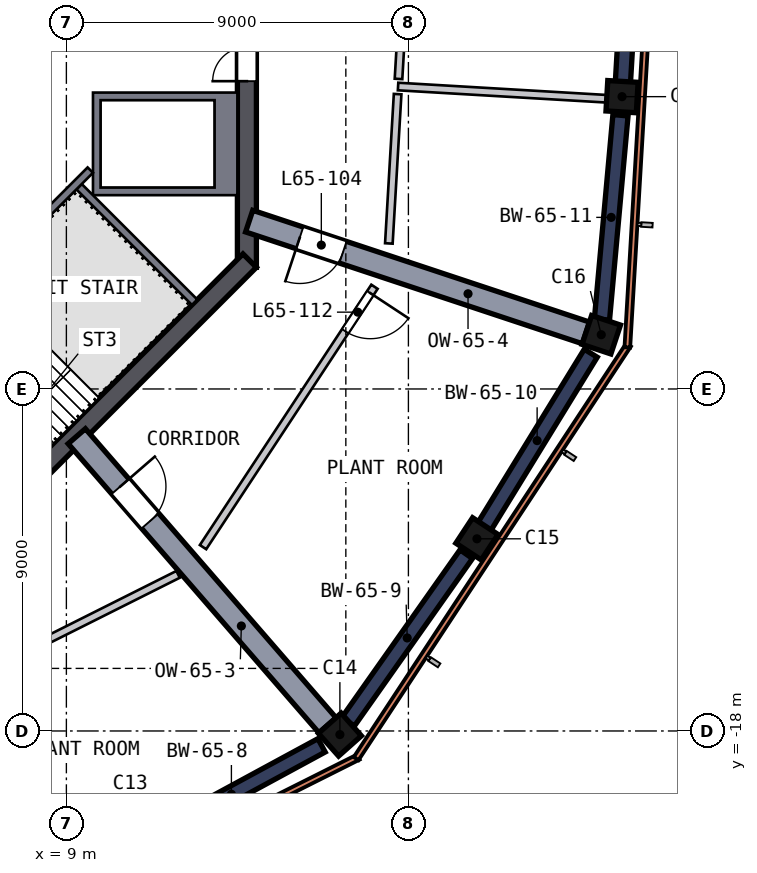
"""IFC4 building model, lengths in metres.
Left out: names, types, materials, properties, quantities, classifications, styles, units other than length and angle.
Written with IfcOpenShell. Run it as: python <this file> out.ifc"""

import sys

from ifc_helpers import new_model, si_unit, direction, frame, frame_2d, origin, origin_2d, place, context, subcontext, project, spatial, polyline, rectangle, outline, extrude, element, fill, save


model = new_model("IFC4")
c1 = context("Model", 3, precision=1e-05, world=origin(), true_north=direction((0.0, 1.0)))
c2 = subcontext(c1, "Body", "Model", "MODEL_VIEW")
j1 = project(units=[si_unit("LENGTHUNIT", "METRE"), si_unit("PLANEANGLEUNIT", "RADIAN")], contexts=[c1])
p1 = place(None, origin())
s1 = spatial("IfcSite", under=j1, at=p1, CompositionType="ELEMENT")
p2 = place(p1, origin())
s2 = spatial("IfcBuilding", under=s1, at=p2, CompositionType="ELEMENT")
p3 = place(p2, frame((0.0, 0.0, 263.0)))
s3 = spatial("IfcBuildingStorey", under=s2, at=p3, CompositionType="ELEMENT", Elevation=263.0)
p4 = place(p3, frame((16.137, -18.15, 0.0), z_axis=(0.050177782, 0.045360282, 0.997709695), x_axis=(-0.745725805, -0.662810667, 0.06763906)))
e1 = element("IfcColumn", 1, at=p4, inside=s3, PredefinedType="COLUMN", context=c2, shape_type="SweptSolid", body=[
    extrude(rectangle(XDim=0.8, YDim=0.8, at=origin_2d()), origin(), (0.0, 0.0, 1.0), 4.51),
])
p5 = place(p3, frame((19.76, -13.01, 0.0), z_axis=(0.035783507, 0.055380526, 0.997823901), x_axis=(0.548557504, 0.833509154, -0.065932963)))
e2 = element("IfcColumn", 2, at=p5, inside=s3, PredefinedType="COLUMN", context=c2, shape_type="SweptSolid", body=[
    extrude(rectangle(XDim=0.8, YDim=0.8, at=origin_2d()), origin(), (0.0, 0.0, 1.0), 4.51),
])
p6 = place(p3, frame((23.05, -7.65, 0.0), z_axis=(0.020785631, 0.064359674, 0.997710274), x_axis=(-0.314605933, -0.946810023, 0.067630523)))
e3 = element("IfcColumn", 3, at=p6, inside=s3, PredefinedType="COLUMN", context=c2, shape_type="SweptSolid", body=[
    extrude(rectangle(XDim=0.8, YDim=0.8, at=origin_2d()), origin(), (0.0, 0.0, 1.0), 4.51),
])
p7 = place(p3, frame((23.618, -1.387, 0.0), z_axis=(0.003302254, 0.065882664, 0.997821913), x_axis=(0.058334022, 0.996115464, -0.065963048)))
e4 = element("IfcColumn", 4, at=p7, inside=s3, PredefinedType="COLUMN", context=c2, shape_type="SweptSolid", body=[
    extrude(rectangle(XDim=0.8, YDim=0.8, at=origin_2d()), origin(), (0.0, 0.0, 1.0), 4.51),
])
p8 = place(p3, frame((13.75, -5.799, 0.0), z_axis=(0.0, 0.0, 1.0), x_axis=(0.0, 1.0, 0.0)))
e5 = element("IfcWall", 5, at=p8, inside=s3, PredefinedType="SHEAR", context=c2, shape_type="SweptSolid", body=[
    extrude(rectangle(XDim=11.598, YDim=0.5, at=frame_2d((5.799, 0.0))), origin(), (0.0, 0.0, 1.0), 6.0),
])
p9 = place(p8, frame((4.899, 0.0, 0.0)))
e6 = element("IfcOpeningElement", 6, at=p9, cuts=e5, PredefinedType="OPENING", context=c2, shape_type="SweptSolid", body=[
    extrude(rectangle(XDim=1.8, YDim=2.1, at=frame_2d((0.9, 1.05))), frame((0.0, 0.26, 0.0), z_axis=(0.0, -1.0, 0.0), x_axis=(1.0, 0.0, 0.0)), (0.0, 0.0, 1.0), 0.52),
])
p10 = place(p3, frame((5.622, -13.823, 0.0), z_axis=(0.0, 0.0, 1.0), x_axis=(0.707106781, 0.707106781, 0.0)))
e7 = element("IfcWall", 7, at=p10, inside=s3, PredefinedType="SHEAR", context=c2, shape_type="SweptSolid", body=[
    extrude(rectangle(XDim=11.598, YDim=0.5, at=frame_2d((5.799, 0.0))), origin(), (0.0, 0.0, 1.0), 6.0),
])
p11 = place(p10, frame((2.099, 0.0, 0.0)))
e8 = element("IfcOpeningElement", 8, at=p11, cuts=e7, PredefinedType="OPENING", context=c2, shape_type="SweptSolid", body=[
    extrude(rectangle(XDim=1.2, YDim=2.1, at=frame_2d((0.6, 1.05))), frame((0.0, 0.26, 0.0), z_axis=(0.0, -1.0, 0.0), x_axis=(1.0, 0.0, 0.0)), (0.0, 0.0, 1.0), 0.52),
])
p12 = place(p3, frame((10.971, -20.95, 0.0), z_axis=(0.0, 0.0, 1.0), x_axis=(0.879122155, 0.476596513, 0.0)))
e9 = element("IfcWall", 9, at=p12, inside=s3, PredefinedType="SHEAR", context=c2, shape_type="SweptSolid", body=[
    extrude(rectangle(XDim=5.396, YDim=0.4, at=frame_2d((2.698, 0.0))), origin(), (0.0, 0.0, 1.0), 4.5),
])
for number, where, z_axis, x_axis in (
    (10, (16.414, -17.757, 0.0), (0.0, 0.0, 1.0), (0.576, 0.817, 0.0)),
    (11, (19.976, -12.658, 0.0), (0.0, 0.0, 1.0), (0.523, 0.852, 0.0)),
):
    element("IfcWall", number, at=place(p3, frame(where, z_axis=z_axis, x_axis=x_axis)), inside=s3, PredefinedType="SHEAR", context=c2, shape_type="SweptSolid", body=[
        extrude(rectangle(XDim=5.396, YDim=0.4, at=frame_2d((2.698, 0.0))), origin(), (0.0, 0.0, 1.0), 4.5),
    ])
p13 = place(p3, frame((23.093, -7.171, 0.0), z_axis=(0.0, 0.0, 1.0), x_axis=(0.090315437, 0.99591321, 0.0)))
e12 = element("IfcWall", 12, at=p13, inside=s3, PredefinedType="SHEAR", context=c2, shape_type="SweptSolid", body=[
    extrude(rectangle(XDim=5.396, YDim=0.4, at=frame_2d((2.698, 0.0))), origin(), (0.0, 0.0, 1.0), 4.5),
])
p14 = place(p3, frame((23.641, -0.987, 0.0), z_axis=(0.0, 0.0, 1.0), x_axis=(0.058593459, 0.998281927, 0.0)))
e13 = element("IfcWall", 13, at=p14, inside=s3, PredefinedType="SHEAR", context=c2, shape_type="SweptSolid", body=[
    extrude(rectangle(XDim=5.9, YDim=0.4, at=frame_2d((2.95, 0.0))), origin(), (0.0, 0.0, 1.0), 4.5),
])
p15 = place(p3, frame((9.273, -10.243, 0.0), z_axis=(0.0, 0.0, 1.0), x_axis=(0.65518711, -0.755466645, 0.0)))
e14 = element("IfcWall", 14, at=p15, inside=s3, PredefinedType="SHEAR", context=c2, shape_type="SweptSolid", body=[
    extrude(rectangle(XDim=10.07, YDim=0.6, at=frame_2d((5.035, 0.0))), origin(), (0.0, 0.0, 1.0), 4.5),
])
p16 = place(p15, frame((1.75, 0.0, 0.0)))
e15 = element("IfcOpeningElement", 15, at=p16, cuts=e14, PredefinedType="OPENING", context=c2, shape_type="SweptSolid", body=[
    extrude(rectangle(XDim=1.2, YDim=2.1, at=frame_2d((0.6, 1.05))), frame((0.0, 0.31, 0.0), z_axis=(0.0, -1.0, 0.0), x_axis=(1.0, 0.0, 0.0)), (0.0, 0.0, 1.0), 0.62),
])
p17 = place(p3, frame((13.81, -4.583, 0.0), z_axis=(0.0, 0.0, 1.0), x_axis=(0.949093112, -0.314995658, 0.0)))
e16 = element("IfcWall", 16, at=p17, inside=s3, PredefinedType="SHEAR", context=c2, shape_type="SweptSolid", body=[
    extrude(rectangle(XDim=9.335, YDim=0.6, at=frame_2d((4.667, 0.0))), origin(), (0.0, 0.0, 1.0), 4.5),
])
p18 = place(p17, frame((1.4, 0.0, 0.0)))
e17 = element("IfcOpeningElement", 17, at=p18, cuts=e16, PredefinedType="OPENING", context=c2, shape_type="SweptSolid", body=[
    extrude(rectangle(XDim=1.2, YDim=2.1, at=frame_2d((0.6, 1.05))), frame((0.0, 0.31, 0.0), z_axis=(0.0, -1.0, 0.0), x_axis=(1.0, 0.0, 0.0)), (0.0, 0.0, 1.0), 0.62),
])
p19 = place(p3, frame((5.023, -24.536, 0.0), z_axis=(0.0, 0.0, 1.0), x_axis=(0.893850085, 0.448365951, 0.0)))
e18 = element("IfcWall", 18, at=p19, inside=s3, PredefinedType="SOLIDWALL", context=c2, shape_type="SweptSolid", body=[
    extrude(rectangle(XDim=13.046, YDim=0.15, at=frame_2d((6.523, 0.0))), origin(), (0.0, 0.0, 1.0), 4.5),
])
p20 = place(p3, frame((16.624, -18.727, 0.0), z_axis=(0.0, 0.0, 1.0), x_axis=(0.549910588, 0.83522353, 0.0)))
e19 = element("IfcWall", 19, at=p20, inside=s3, PredefinedType="SOLIDWALL", context=c2, shape_type="SweptSolid", body=[
    extrude(rectangle(XDim=13.035, YDim=0.15, at=frame_2d((6.517, 0.0))), origin(), (0.0, 0.0, 1.0), 4.5),
])
p21 = place(p3, frame((23.761, -7.906, 0.0), z_axis=(0.0, 0.0, 1.0), x_axis=(0.058612563, 0.998280806, 0.0)))
e20 = element("IfcWall", 20, at=p21, inside=s3, PredefinedType="SOLIDWALL", context=c2, shape_type="SweptSolid", body=[
    extrude(rectangle(XDim=13.075, YDim=0.15, at=frame_2d((6.538, 0.0))), origin(), (0.0, 0.0, 1.0), 4.5),
])
p22 = place(p3, origin())
e21 = element("IfcWall", 21, at=p22, inside=s3, PredefinedType="SOLIDWALL", context=c2, shape_type="SweptSolid", body=[
    extrude(outline(polyline([(13.5, -1.2), (13.5, -3.9), (9.7, -3.9), (9.7, -1.2), (13.5, -1.2)]), holes=[polyline([(9.9, -3.7), (12.9, -3.7), (12.9, -1.4), (9.9, -1.4), (9.9, -3.7)])]), origin(), (0.0, 0.0, 1.0), 5.55),
])
p23 = place(p3, frame((9.629, -3.24, 0.0), z_axis=(0.0, 0.0, 1.0), x_axis=(-0.707120946, -0.707092617, 0.0)))
e22 = element("IfcWall", 22, at=p23, inside=s3, PredefinedType="SOLIDWALL", context=c2, shape_type="SweptSolid", body=[
    extrude(rectangle(XDim=8.618, YDim=0.2, at=frame_2d((4.309, 0.0))), origin(), (0.0, 0.0, 1.0), 5.55),
])
p24 = place(p23, frame((7.018, 0.0, 0.0)))
e23 = element("IfcOpeningElement", 23, at=p24, cuts=e22, PredefinedType="OPENING", context=c2, shape_type="SweptSolid", body=[
    extrude(rectangle(XDim=1.2, YDim=2.1, at=frame_2d((0.6, 1.05))), frame((0.0, 0.11, 0.0), z_axis=(0.0, -1.0, 0.0), x_axis=(1.0, 0.0, 0.0)), (0.0, 0.0, 1.0), 0.22),
])
p25 = place(p3, frame((9.334, -3.677, 0.0), z_axis=(0.0, 0.0, 1.0), x_axis=(0.707135168, -0.707078393, 0.0)))
e24 = element("IfcWall", 24, at=p25, inside=s3, PredefinedType="SOLIDWALL", context=c2, shape_type="SweptSolid", body=[
    extrude(rectangle(XDim=4.3, YDim=0.2, at=frame_2d((2.15, 0.0))), origin(), (0.0, 0.0, 1.0), 5.55),
])
p26 = place(p3, frame((11.939, -13.878, 0.0), z_axis=(0.0, 0.0, 1.0), x_axis=(-0.893843051, -0.448379973, 0.0)))
e25 = element("IfcWall", 25, at=p26, inside=s3, PredefinedType="SOLIDWALL", context=c2, shape_type="SweptSolid", body=[
    extrude(rectangle(XDim=9.207, YDim=0.2, at=frame_2d((4.604, 0.0))), origin(), (0.0, 0.0, 1.0), 4.5),
])
p27 = place(p26, frame((6.25, 0.0, 0.0)))
e26 = element("IfcOpeningElement", 26, at=p27, cuts=e25, PredefinedType="OPENING", context=c2, shape_type="SweptSolid", body=[
    extrude(rectangle(XDim=1.2, YDim=2.1, at=frame_2d((0.6, 1.05))), frame((0.0, 0.11, 0.0), z_axis=(0.0, -1.0, 0.0), x_axis=(1.0, 0.0, 0.0)), (0.0, 0.0, 1.0), 0.22),
])
p28 = place(p3, frame((17.107, -6.31, 0.0), z_axis=(0.0, 0.0, 1.0), x_axis=(-0.549883224, -0.835241546, 0.0)))
e27 = element("IfcWall", 27, at=p28, inside=s3, PredefinedType="SOLIDWALL", context=c2, shape_type="SweptSolid", body=[
    extrude(rectangle(XDim=8.203, YDim=0.2, at=frame_2d((4.102, 0.0))), origin(), (0.0, 0.0, 1.0), 4.5),
])
p29 = place(p28, frame((0.2, 0.0, 0.0)))
e28 = element("IfcOpeningElement", 28, at=p29, cuts=e27, PredefinedType="OPENING", context=c2, shape_type="SweptSolid", body=[
    extrude(rectangle(XDim=1.2, YDim=2.1, at=frame_2d((0.6, 1.05))), frame((0.0, 0.11, 0.0), z_axis=(0.0, -1.0, 0.0), x_axis=(1.0, 0.0, 0.0)), (0.0, 0.0, 1.0), 0.22),
])
p30 = place(p3, frame((17.485, -5.17, 0.0), z_axis=(0.0, 0.0, 1.0), x_axis=(0.058605687, 0.99828121, 0.0)))
e29 = element("IfcWall", 29, at=p30, inside=s3, PredefinedType="SOLIDWALL", context=c2, shape_type="SweptSolid", body=[
    extrude(rectangle(XDim=3.937, YDim=0.2, at=frame_2d((1.968, 0.0))), origin(), (0.0, 0.0, 1.0), 4.5),
])
p31 = place(p3, frame((17.995, 3.51, 0.0), z_axis=(0.0, 0.0, 1.0), x_axis=(-0.058653059, -0.998278427, 0.0)))
e30 = element("IfcWall", 30, at=p31, inside=s3, PredefinedType="SOLIDWALL", context=c2, shape_type="SweptSolid", body=[
    extrude(rectangle(XDim=4.358, YDim=0.2, at=frame_2d((2.179, 0.0))), origin(), (0.0, 0.0, 1.0), 4.5),
])
p32 = place(p31, frame((1.6, 0.0, 0.0)))
e31 = element("IfcOpeningElement", 31, at=p32, cuts=e30, PredefinedType="OPENING", context=c2, shape_type="SweptSolid", body=[
    extrude(rectangle(XDim=1.2, YDim=2.1, at=frame_2d((0.6, 1.05))), frame((0.0, 0.11, 0.0), z_axis=(0.0, -1.0, 0.0), x_axis=(1.0, 0.0, 0.0)), (0.0, 0.0, 1.0), 0.22),
])
p33 = place(p3, frame((17.728, -1.041, 0.0), z_axis=(0.0, 0.0, 1.0), x_axis=(0.998279672, -0.05863187, 0.0)))
e32 = element("IfcWall", 32, at=p33, inside=s3, PredefinedType="SOLIDWALL", context=c2, shape_type="SweptSolid", body=[
    extrude(rectangle(XDim=6.35, YDim=0.2, at=frame_2d((3.175, 0.0))), origin(), (0.0, 0.0, 1.0), 4.5),
])
p34 = place(p9, origin())
e33 = element("IfcDoor", 33, at=p34, inside=s3, OperationType="DOUBLE_DOOR_SINGLE_SWING", PredefinedType="DOOR", context=c2, shape_type="SweptSolid", body=[
    extrude(rectangle(XDim=1.8, YDim=2.1, at=frame_2d((0.9, 1.05))), frame((0.0, 0.025, 0.0), z_axis=(0.0, -1.0, 0.0), x_axis=(1.0, 0.0, 0.0)), (0.0, 0.0, 1.0), 0.05),
])
fill(e6, e33)
p35 = place(p16, origin())
e34 = element("IfcDoor", 34, at=p35, inside=s3, OperationType="SINGLE_SWING_LEFT", PredefinedType="DOOR", context=c2, shape_type="SweptSolid", body=[
    extrude(rectangle(XDim=1.2, YDim=2.1, at=frame_2d((0.6, 1.05))), frame((0.0, 0.025, 0.0), z_axis=(0.0, -1.0, 0.0), x_axis=(1.0, 0.0, 0.0)), (0.0, 0.0, 1.0), 0.05),
])
fill(e15, e34)
p36 = place(p18, origin())
e35 = element("IfcDoor", 35, at=p36, inside=s3, OperationType="SINGLE_SWING_LEFT", PredefinedType="DOOR", context=c2, shape_type="SweptSolid", body=[
    extrude(rectangle(XDim=1.2, YDim=2.1, at=frame_2d((0.6, 1.05))), frame((0.0, 0.025, 0.0), z_axis=(0.0, -1.0, 0.0), x_axis=(1.0, 0.0, 0.0)), (0.0, 0.0, 1.0), 0.05),
])
fill(e17, e35)
p37 = place(p29, origin())
e36 = element("IfcDoor", 36, at=p37, inside=s3, OperationType="SINGLE_SWING_LEFT", PredefinedType="DOOR", context=c2, shape_type="SweptSolid", body=[
    extrude(rectangle(XDim=1.2, YDim=2.1, at=frame_2d((0.6, 1.05))), frame((0.0, 0.025, 0.0), z_axis=(0.0, -1.0, 0.0), x_axis=(1.0, 0.0, 0.0)), (0.0, 0.0, 1.0), 0.05),
])
fill(e28, e36)
save(model, sys.argv[1])
